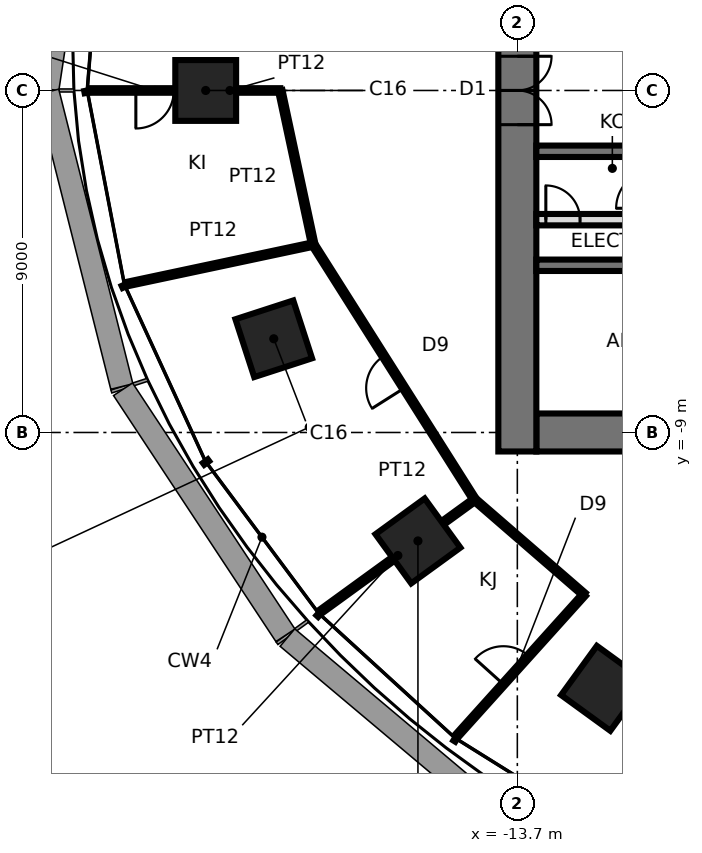
"""IFC4 building model, lengths in metres.
Left out: names, types, materials, properties, quantities, classifications, styles, units other than length and angle.
Written with IfcOpenShell. Run it as: python <this file> out.ifc"""

import sys

from ifc_helpers import new_model, si_unit, direction, frame, frame_2d, origin, origin_2d, place, context, subcontext, project, spatial, rectangle, extrude, element, fill, save


model = new_model("IFC4")
c1 = context("Model", 3, precision=1e-05, world=origin(), true_north=direction((0.0, 1.0)))
c2 = subcontext(c1, "Body", "Model", "MODEL_VIEW")
j1 = project(units=[si_unit("LENGTHUNIT", "METRE"), si_unit("PLANEANGLEUNIT", "RADIAN")], contexts=[c1])
p1 = place(None, origin())
s1 = spatial("IfcSite", under=j1, at=p1, CompositionType="ELEMENT")
p2 = place(p1, origin())
s2 = spatial("IfcBuilding", under=s1, at=p2, CompositionType="ELEMENT")
p3 = place(p2, frame((0.0, 0.0, 96.3)))
s3 = spatial("IfcBuildingStorey", under=s2, at=p3, CompositionType="ELEMENT", Elevation=96.3)
for number, where, z_axis, x_axis in (
    (1, (-21.9, 0.0, 0.0), (0.0, 0.0, 1.0), (-1.0, 0.0, 0.0)),
    (2, (-20.109, -6.534, 0.0), (0.0, 0.0, 1.0), (-0.951, -0.309, 0.0)),
    (3, (-16.315, -11.854, 0.0), (0.0, 0.0, 1.0), (-0.809, -0.588, 0.0)),
    (4, (-11.43, -15.733, 0.0), (0.0, 0.0, 1.0), (-0.588, -0.809, 0.0)),
):
    element("IfcColumn", number, at=place(p3, frame(where, z_axis=z_axis, x_axis=x_axis)), inside=s3, PredefinedType="COLUMN", context=c2, shape_type="SweptSolid", body=[
        extrude(rectangle(XDim=1.6, YDim=1.6, at=origin_2d()), origin(), (0.0, 0.0, 1.0), 3.9),
    ])
p4 = place(p3, frame((-13.2, -9.0, 0.0), z_axis=(0.0, 0.0, 1.0), x_axis=(1.0, 0.0, 0.0)))
e5 = element("IfcWall", 5, at=p4, inside=s3, PredefinedType="SHEAR", context=c2, shape_type="SweptSolid", body=[
    extrude(rectangle(XDim=26.4, YDim=1.0, at=frame_2d((13.2, 0.0))), origin(), (0.0, 0.0, 1.0), 3.9),
])
p5 = place(p4, frame((2.65, 0.0, 0.0)))
e6 = element("IfcOpeningElement", 6, at=p5, cuts=e5, PredefinedType="OPENING", context=c2, shape_type="SweptSolid", body=[
    extrude(rectangle(XDim=0.9, YDim=2.1, at=frame_2d((0.45, 1.05))), frame((0.0, 0.51, 0.0), z_axis=(0.0, -1.0, 0.0), x_axis=(1.0, 0.0, 0.0)), (0.0, 0.0, 1.0), 1.02),
])
p6 = place(p4, frame((9.5, 0.0, 0.0)))
e7 = element("IfcOpeningElement", 7, at=p6, cuts=e5, PredefinedType="OPENING", context=c2, shape_type="SweptSolid", body=[
    extrude(rectangle(XDim=0.9, YDim=2.1, at=frame_2d((0.45, 1.05))), frame((0.0, 0.51, 0.0), z_axis=(0.0, -1.0, 0.0), x_axis=(1.0, 0.0, 0.0)), (0.0, 0.0, 1.0), 1.02),
])
p7 = place(p4, frame((16.0, 0.0, 0.0)))
e8 = element("IfcOpeningElement", 8, at=p7, cuts=e5, PredefinedType="OPENING", context=c2, shape_type="SweptSolid", body=[
    extrude(rectangle(XDim=0.9, YDim=2.1, at=frame_2d((0.45, 1.05))), frame((0.0, 0.51, 0.0), z_axis=(0.0, -1.0, 0.0), x_axis=(1.0, 0.0, 0.0)), (0.0, 0.0, 1.0), 1.02),
])
p8 = place(p4, frame((22.85, 0.0, 0.0)))
e9 = element("IfcOpeningElement", 9, at=p8, cuts=e5, PredefinedType="OPENING", context=c2, shape_type="SweptSolid", body=[
    extrude(rectangle(XDim=0.9, YDim=2.1, at=frame_2d((0.45, 1.05))), frame((0.0, 0.51, 0.0), z_axis=(0.0, -1.0, 0.0), x_axis=(1.0, 0.0, 0.0)), (0.0, 0.0, 1.0), 1.02),
])
p9 = place(p3, frame((-13.7, 9.5, 0.0), z_axis=(0.0, 0.0, 1.0), x_axis=(0.0, -1.0, 0.0)))
e10 = element("IfcWall", 10, at=p9, inside=s3, PredefinedType="SHEAR", context=c2, shape_type="SweptSolid", body=[
    extrude(rectangle(XDim=19.0, YDim=1.0, at=frame_2d((9.5, 0.0))), origin(), (0.0, 0.0, 1.0), 3.9),
])
p10 = place(p9, frame((8.6, 0.0, 0.0)))
e11 = element("IfcOpeningElement", 11, at=p10, cuts=e10, PredefinedType="OPENING", context=c2, shape_type="SweptSolid", body=[
    extrude(rectangle(XDim=1.8, YDim=2.4, at=frame_2d((0.9, 1.2))), frame((0.0, 0.51, 0.0), z_axis=(0.0, -1.0, 0.0), x_axis=(1.0, 0.0, 0.0)), (0.0, 0.0, 1.0), 1.02),
])
p11 = place(p3, frame((-13.2, -1.6, 0.0), z_axis=(0.0, 0.0, 1.0), x_axis=(1.0, 0.0, 0.0)))
e12 = element("IfcWall", 12, at=p11, inside=s3, PredefinedType="SHEAR", context=c2, shape_type="SweptSolid", body=[
    extrude(rectangle(XDim=26.4, YDim=0.3, at=frame_2d((13.2, 0.0))), origin(), (0.0, 0.0, 1.0), 3.9),
])
p12 = place(p11, frame((25.15, 0.0, 0.0)))
e13 = element("IfcOpeningElement", 13, at=p12, cuts=e12, PredefinedType="OPENING", context=c2, shape_type="SweptSolid", body=[
    extrude(rectangle(XDim=1.0, YDim=2.1, at=frame_2d((0.5, 1.05))), frame((0.0, 0.16, 0.0), z_axis=(0.0, -1.0, 0.0), x_axis=(1.0, 0.0, 0.0)), (0.0, 0.0, 1.0), 0.32),
])
p13 = place(p11, frame((7.45, 0.0, 0.0)))
e14 = element("IfcOpeningElement", 14, at=p13, cuts=e12, PredefinedType="OPENING", context=c2, shape_type="SweptSolid", body=[
    extrude(rectangle(XDim=1.1, YDim=2.3, at=frame_2d((0.55, 1.15))), frame((0.0, 0.16, 0.0), z_axis=(0.0, -1.0, 0.0), x_axis=(1.0, 0.0, 0.0)), (0.0, 0.0, 1.0), 0.32),
])
p14 = place(p11, frame((10.05, 0.0, 0.0)))
e15 = element("IfcOpeningElement", 15, at=p14, cuts=e12, PredefinedType="OPENING", context=c2, shape_type="SweptSolid", body=[
    extrude(rectangle(XDim=1.1, YDim=2.3, at=frame_2d((0.55, 1.15))), frame((0.0, 0.16, 0.0), z_axis=(0.0, -1.0, 0.0), x_axis=(1.0, 0.0, 0.0)), (0.0, 0.0, 1.0), 0.32),
])
p15 = place(p11, frame((12.65, 0.0, 0.0)))
e16 = element("IfcOpeningElement", 16, at=p15, cuts=e12, PredefinedType="OPENING", context=c2, shape_type="SweptSolid", body=[
    extrude(rectangle(XDim=1.1, YDim=2.3, at=frame_2d((0.55, 1.15))), frame((0.0, 0.16, 0.0), z_axis=(0.0, -1.0, 0.0), x_axis=(1.0, 0.0, 0.0)), (0.0, 0.0, 1.0), 0.32),
])
p16 = place(p11, frame((15.25, 0.0, 0.0)))
e17 = element("IfcOpeningElement", 17, at=p16, cuts=e12, PredefinedType="OPENING", context=c2, shape_type="SweptSolid", body=[
    extrude(rectangle(XDim=1.1, YDim=2.3, at=frame_2d((0.55, 1.15))), frame((0.0, 0.16, 0.0), z_axis=(0.0, -1.0, 0.0), x_axis=(1.0, 0.0, 0.0)), (0.0, 0.0, 1.0), 0.32),
])
p17 = place(p11, frame((17.85, 0.0, 0.0)))
e18 = element("IfcOpeningElement", 18, at=p17, cuts=e12, PredefinedType="OPENING", context=c2, shape_type="SweptSolid", body=[
    extrude(rectangle(XDim=1.1, YDim=2.3, at=frame_2d((0.55, 1.15))), frame((0.0, 0.16, 0.0), z_axis=(0.0, -1.0, 0.0), x_axis=(1.0, 0.0, 0.0)), (0.0, 0.0, 1.0), 0.32),
])
p18 = place(p11, frame((5.55, 0.0, 0.0)))
e19 = element("IfcOpeningElement", 19, at=p18, cuts=e12, PredefinedType="OPENING", context=c2, shape_type="SweptSolid", body=[
    extrude(rectangle(XDim=0.9, YDim=2.1, at=frame_2d((0.45, 1.05))), frame((0.0, 0.16, 0.0), z_axis=(0.0, -1.0, 0.0), x_axis=(1.0, 0.0, 0.0)), (0.0, 0.0, 1.0), 0.32),
])
p19 = place(p3, frame((-13.2, -4.6, 0.0), z_axis=(0.0, 0.0, 1.0), x_axis=(1.0, 0.0, 0.0)))
e20 = element("IfcWall", 20, at=p19, inside=s3, PredefinedType="SHEAR", context=c2, shape_type="SweptSolid", body=[
    extrude(rectangle(XDim=26.4, YDim=0.3, at=frame_2d((13.2, 0.0))), origin(), (0.0, 0.0, 1.0), 3.9),
])
p20 = place(p3, frame((-13.2, -3.4, 0.0), z_axis=(0.0, 0.0, 1.0), x_axis=(1.0, 0.0, 0.0)))
e21 = element("IfcWall", 21, at=p20, inside=s3, PredefinedType="SOLIDWALL", context=c2, shape_type="SweptSolid", body=[
    extrude(rectangle(XDim=6.55, YDim=0.3, at=frame_2d((3.275, 0.0))), origin(), (0.0, 0.0, 1.0), 3.74),
])
p21 = place(p20, frame((0.25, 0.0, 0.0)))
e22 = element("IfcOpeningElement", 22, at=p21, cuts=e21, PredefinedType="OPENING", context=c2, shape_type="SweptSolid", body=[
    extrude(rectangle(XDim=0.9, YDim=2.1, at=frame_2d((0.45, 1.05))), frame((0.0, 0.16, 0.0), z_axis=(0.0, -1.0, 0.0), x_axis=(1.0, 0.0, 0.0)), (0.0, 0.0, 1.0), 0.32),
])
p22 = place(p3, frame((-19.07, -4.053, 0.0), z_axis=(0.0, 0.0, 1.0), x_axis=(-0.209484846429, 0.977811893524, 0.0)))
e23 = element("IfcWall", 23, at=p22, inside=s3, PredefinedType="PARTITIONING", context=c2, shape_type="SweptSolid", body=[
    extrude(rectangle(XDim=4.146, YDim=0.12, at=frame_2d((2.073, 0.0))), origin(), (0.0, 0.0, 1.0), 3.74),
])
p23 = place(p3, frame((-19.07, -4.053, 0.0), z_axis=(0.0, 0.0, 1.0), x_axis=(-0.978149046495, -0.207904888932, 0.0)))
e24 = element("IfcWall", 24, at=p23, inside=s3, PredefinedType="PARTITIONING", context=c2, shape_type="SweptSolid", body=[
    extrude(rectangle(XDim=5.0, YDim=0.12, at=frame_2d((2.5, 0.0))), origin(), (0.0, 0.0, 1.0), 3.74),
])
p24 = place(p3, frame((-14.821, -10.768, 0.0), z_axis=(0.0, 0.0, 1.0), x_axis=(-0.534710673456, 0.845035203818, 0.0)))
e25 = element("IfcWall", 25, at=p24, inside=s3, PredefinedType="PARTITIONING", context=c2, shape_type="SweptSolid", body=[
    extrude(rectangle(XDim=7.946, YDim=0.12, at=frame_2d((3.973, 0.0))), origin(), (0.0, 0.0, 1.0), 3.74),
])
p25 = place(p24, frame((3.473, 0.0, 0.0)))
e26 = element("IfcOpeningElement", 26, at=p25, cuts=e25, PredefinedType="OPENING", context=c2, shape_type="SweptSolid", body=[
    extrude(rectangle(XDim=1.0, YDim=2.4, at=frame_2d((0.5, 1.2))), frame((0.0, 0.07, 0.0), z_axis=(0.0, -1.0, 0.0), x_axis=(1.0, 0.0, 0.0)), (0.0, 0.0, 1.0), 0.14),
])
p26 = place(p3, frame((-14.821, -10.768, 0.0), z_axis=(0.0, 0.0, 1.0), x_axis=(-0.809042143657, -0.587750635718, 0.0)))
e27 = element("IfcWall", 27, at=p26, inside=s3, PredefinedType="PARTITIONING", context=c2, shape_type="SweptSolid", body=[
    extrude(rectangle(XDim=5.0, YDim=0.12, at=frame_2d((2.5, 0.0))), origin(), (0.0, 0.0, 1.0), 2.94),
])
p27 = place(p3, frame((-11.942, -13.263, 0.0), z_axis=(0.0, 0.0, 1.0), x_axis=(-0.755744060509, 0.654867097208, 0.0)))
e28 = element("IfcWall", 28, at=p27, inside=s3, PredefinedType="PARTITIONING", context=c2, shape_type="SweptSolid", body=[
    extrude(rectangle(XDim=3.809, YDim=0.12, at=frame_2d((1.905, 0.0))), origin(), (0.0, 0.0, 1.0), 3.74),
])
p28 = place(p3, frame((-15.288, -16.979, 0.0), z_axis=(0.0, 0.0, 1.0), x_axis=(0.669126573551, 0.743148456614, 0.0)))
e29 = element("IfcWall", 29, at=p28, inside=s3, PredefinedType="PARTITIONING", context=c2, shape_type="SweptSolid", body=[
    extrude(rectangle(XDim=5.0, YDim=0.12, at=frame_2d((2.5, 0.0))), origin(), (0.0, 0.0, 1.0), 3.74),
])
p29 = place(p28, frame((1.822, 0.0, 0.0)))
e30 = element("IfcOpeningElement", 30, at=p29, cuts=e29, PredefinedType="OPENING", context=c2, shape_type="SweptSolid", body=[
    extrude(rectangle(XDim=1.0, YDim=2.4, at=frame_2d((0.5, 1.2))), frame((0.0, 0.07, 0.0), z_axis=(0.0, -1.0, 0.0), x_axis=(1.0, 0.0, 0.0)), (0.0, 0.0, 1.0), 0.14),
])
p30 = place(p3, frame((-19.938, 0.0, 0.0), z_axis=(0.0, 0.0, 1.0), x_axis=(-1.0, 0.0, 0.0)))
e31 = element("IfcWall", 31, at=p30, inside=s3, PredefinedType="PARTITIONING", context=c2, shape_type="SweptSolid", body=[
    extrude(rectangle(XDim=5.0, YDim=0.12, at=frame_2d((2.5, 0.0))), origin(), (0.0, 0.0, 1.0), 2.94),
])
p31 = place(p30, frame((2.8, 0.0, 0.0)))
e32 = element("IfcOpeningElement", 32, at=p31, cuts=e31, PredefinedType="OPENING", context=c2, shape_type="SweptSolid", body=[
    extrude(rectangle(XDim=1.0, YDim=2.4, at=frame_2d((0.5, 1.2))), frame((0.0, 0.07, 0.0), z_axis=(0.0, -1.0, 0.0), x_axis=(1.0, 0.0, 0.0)), (0.0, 0.0, 1.0), 0.14),
])
p32 = place(p10, origin())
e33 = element("IfcDoor", 33, at=p32, inside=s3, OperationType="DOUBLE_DOOR_SINGLE_SWING", PredefinedType="DOOR", context=c2, shape_type="SweptSolid", body=[
    extrude(rectangle(XDim=1.72, YDim=2.36, at=frame_2d((0.9, 1.18))), frame((0.0, 0.025, 0.0), z_axis=(0.0, -1.0, 0.0), x_axis=(1.0, 0.0, 0.0)), (0.0, 0.0, 1.0), 0.05),
    extrude(rectangle(XDim=0.04, YDim=2.4, at=frame_2d((0.02, 1.2))), frame((0.0, 0.25, 0.0), z_axis=(0.0, -1.0, 0.0), x_axis=(1.0, 0.0, 0.0)), (0.0, 0.0, 1.0), 0.5),
    extrude(rectangle(XDim=0.04, YDim=2.4, at=frame_2d((1.78, 1.2))), frame((0.0, 0.25, 0.0), z_axis=(0.0, -1.0, 0.0), x_axis=(1.0, 0.0, 0.0)), (0.0, 0.0, 1.0), 0.5),
    extrude(rectangle(XDim=1.72, YDim=0.04, at=frame_2d((0.9, 2.38))), frame((0.0, 0.25, 0.0), z_axis=(0.0, -1.0, 0.0), x_axis=(1.0, 0.0, 0.0)), (0.0, 0.0, 1.0), 0.5),
])
fill(e11, e33)
p33 = place(p21, origin())
e34 = element("IfcDoor", 34, at=p33, inside=s3, OperationType="SINGLE_SWING_LEFT", PredefinedType="DOOR", context=c2, shape_type="SweptSolid", body=[
    extrude(rectangle(XDim=0.9, YDim=2.1, at=frame_2d((0.45, 1.05))), frame((0.0, 0.025, 0.0), z_axis=(0.0, -1.0, 0.0), x_axis=(1.0, 0.0, 0.0)), (0.0, 0.0, 1.0), 0.05),
])
fill(e22, e34)
p34 = place(p31, origin())
e35 = element("IfcDoor", 35, at=p34, inside=s3, OperationType="SINGLE_SWING_RIGHT", PredefinedType="DOOR", context=c2, shape_type="SweptSolid", body=[
    extrude(rectangle(XDim=1.0, YDim=2.4, at=frame_2d((0.5, 1.2))), frame((0.0, 0.025, 0.0), z_axis=(0.0, -1.0, 0.0), x_axis=(1.0, 0.0, 0.0)), (0.0, 0.0, 1.0), 0.05),
])
fill(e32, e35)
p35 = place(p25, origin())
e36 = element("IfcDoor", 36, at=p35, inside=s3, OperationType="SINGLE_SWING_LEFT", PredefinedType="DOOR", context=c2, shape_type="SweptSolid", body=[
    extrude(rectangle(XDim=1.0, YDim=2.4, at=frame_2d((0.5, 1.2))), frame((0.0, 0.025, 0.0), z_axis=(0.0, -1.0, 0.0), x_axis=(1.0, 0.0, 0.0)), (0.0, 0.0, 1.0), 0.05),
])
fill(e26, e36)
p36 = place(p29, origin())
e37 = element("IfcDoor", 37, at=p36, inside=s3, OperationType="SINGLE_SWING_LEFT", PredefinedType="DOOR", context=c2, shape_type="SweptSolid", body=[
    extrude(rectangle(XDim=1.0, YDim=2.4, at=frame_2d((0.5, 1.2))), frame((0.0, 0.025, 0.0), z_axis=(0.0, -1.0, 0.0), x_axis=(1.0, 0.0, 0.0)), (0.0, 0.0, 1.0), 0.05),
])
fill(e30, e37)
save(model, sys.argv[1])
